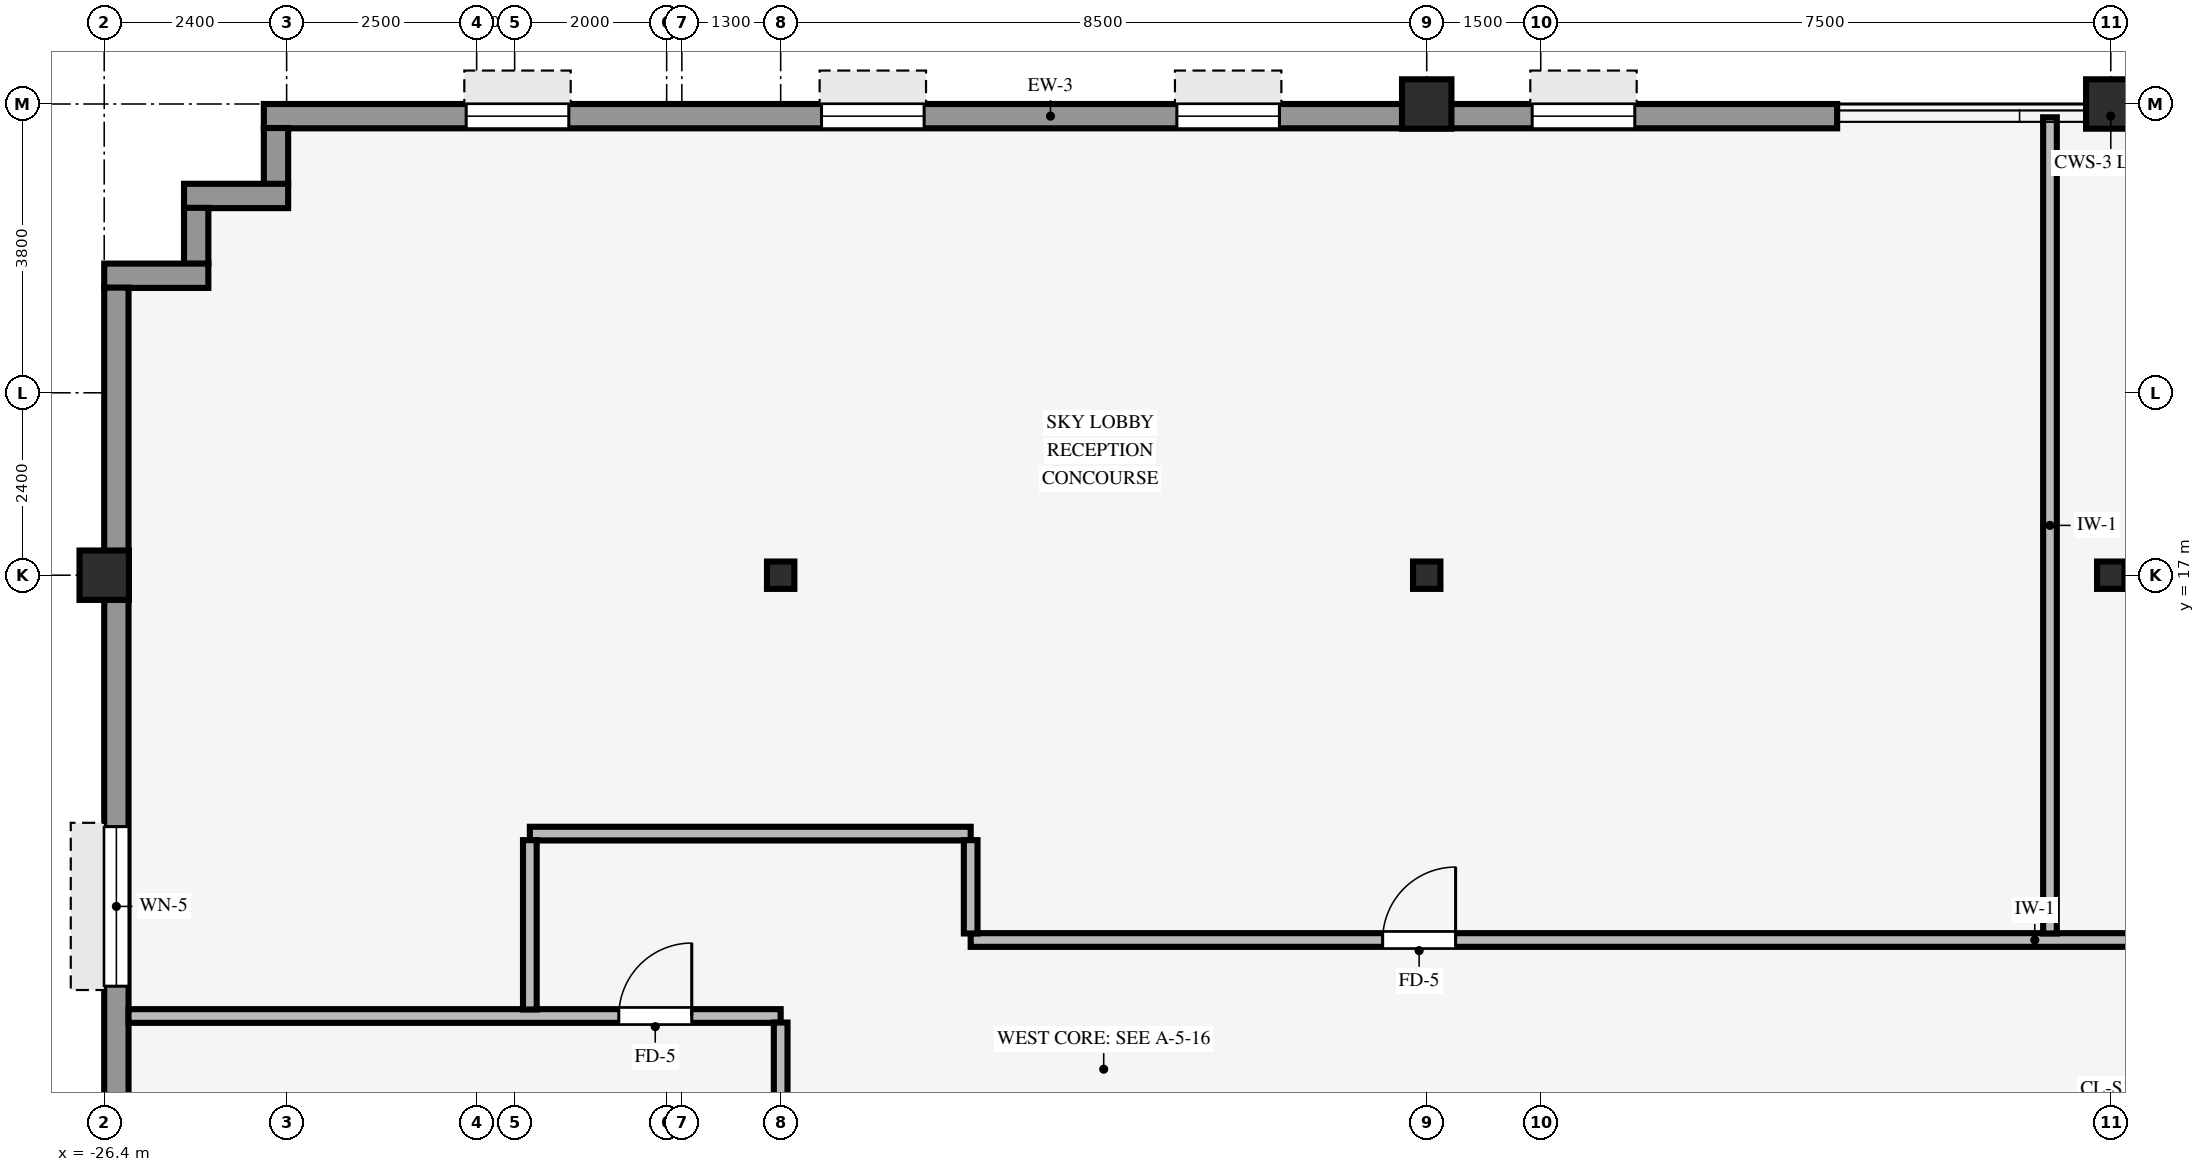
"""IFC4 building model, lengths in metres.
Left out: names, types, materials, properties, quantities, classifications, styles, units other than length and angle.
Written with IfcOpenShell. Run it as: python <this file> out.ifc"""

import sys

from ifc_helpers import new_model, si_unit, direction, frame, frame_2d, origin, origin_2d, place, context, subcontext, project, spatial, rectangle, hollow_rectangle, i_section, extrude, source, transform, mapped, element, fill, save


model = new_model("IFC4")
c1 = context("Model", 3, precision=1e-05, world=origin(), true_north=direction((0.0, 1.0)))
c2 = subcontext(c1, "Body", "Model", "MODEL_VIEW")
j1 = project(units=[si_unit("LENGTHUNIT", "METRE"), si_unit("PLANEANGLEUNIT", "RADIAN")], contexts=[c1])
p1 = place(None, origin())
s1 = spatial("IfcSite", under=j1, at=p1, CompositionType="ELEMENT")
p2 = place(p1, origin())
s2 = spatial("IfcBuilding", under=s1, at=p2, CompositionType="ELEMENT")
p3 = place(p2, frame((0.0, 0.0, 120.2)))
s3 = spatial("IfcBuildingStorey", under=s2, at=p3, CompositionType="ELEMENT", Elevation=120.2)
for number, where, z_axis, x_axis in (
    (1, (-26.4, 17.0, 0.0), (0.0, 0.0, 1.0), (1.0, 0.0, 0.0)),
    (2, (-9.0, 23.2, 0.0), (0.0, 0.0, 1.0), (1.0, 0.0, 0.0)),
    (3, (0.0, 23.2, 0.0), (0.0, 0.0, 1.0), (1.0, 0.0, 0.0)),
):
    element("IfcColumn", number, at=place(p3, frame(where, z_axis=z_axis, x_axis=x_axis)), inside=s3, PredefinedType="COLUMN", context=c2, shape_type="SweptSolid", body=[
        extrude(hollow_rectangle(XDim=0.65, YDim=0.65, WallThickness=0.04, InnerFilletRadius=0.04, OuterFilletRadius=0.08, at=origin_2d()), origin(), (0.0, 0.0, 1.0), 3.37),
    ])
for number, where, z_axis, x_axis in (
    (4, (0.0, 17.0, 0.0), (0.0, 0.0, 1.0), (1.0, 0.0, 0.0)),
    (5, (-17.5, 17.0, 0.0), (0.0, 0.0, 1.0), (1.0, 0.0, 0.0)),
    (6, (-9.0, 17.0, 0.0), (0.0, 0.0, 1.0), (1.0, 0.0, 0.0)),
):
    element("IfcColumn", number, at=place(p3, frame(where, z_axis=z_axis, x_axis=x_axis)), inside=s3, PredefinedType="COLUMN", context=c2, shape_type="SweptSolid", body=[
        extrude(i_section(OverallWidth=0.36, OverallDepth=0.36, WebThickness=0.021, FlangeThickness=0.021, FilletRadius=0.018, at=origin_2d()), origin(), (0.0, 0.0, 1.0), 3.37),
    ])
p4 = place(p3, frame((-24.3, 23.04, 0.0), z_axis=(0.0, 0.0, 1.0), x_axis=(1.0, 0.0, 0.0)))
e7 = element("IfcWall", 7, at=p4, inside=s3, PredefinedType="STANDARD", context=c2, shape_type="SweptSolid", body=[
    extrude(rectangle(XDim=20.7, YDim=0.32, at=frame_2d((10.35, 0.0))), origin(), (0.0, 0.0, 1.0), 2.705),
])
p5 = place(p4, frame((2.663, 0.0, 0.8)))
e8 = element("IfcOpeningElement", 8, at=p5, cuts=e7, PredefinedType="OPENING", context=c2, shape_type="SweptSolid", body=[
    extrude(rectangle(XDim=1.35, YDim=1.56, at=frame_2d((0.675, 0.78))), frame((0.0, 0.17, 0.0), z_axis=(0.0, -1.0, 0.0), x_axis=(1.0, 0.0, 0.0)), (0.0, 0.0, 1.0), 0.34),
])
p6 = place(p4, frame((7.337, 0.0, 0.8)))
e9 = element("IfcOpeningElement", 9, at=p6, cuts=e7, PredefinedType="OPENING", context=c2, shape_type="SweptSolid", body=[
    extrude(rectangle(XDim=1.35, YDim=1.56, at=frame_2d((0.675, 0.78))), frame((0.0, 0.17, 0.0), z_axis=(0.0, -1.0, 0.0), x_axis=(1.0, 0.0, 0.0)), (0.0, 0.0, 1.0), 0.34),
])
p7 = place(p4, frame((12.012, 0.0, 0.8)))
e10 = element("IfcOpeningElement", 10, at=p7, cuts=e7, PredefinedType="OPENING", context=c2, shape_type="SweptSolid", body=[
    extrude(rectangle(XDim=1.35, YDim=1.56, at=frame_2d((0.675, 0.78))), frame((0.0, 0.17, 0.0), z_axis=(0.0, -1.0, 0.0), x_axis=(1.0, 0.0, 0.0)), (0.0, 0.0, 1.0), 0.34),
])
p8 = place(p4, frame((16.688, 0.0, 0.8)))
e11 = element("IfcOpeningElement", 11, at=p8, cuts=e7, PredefinedType="OPENING", context=c2, shape_type="SweptSolid", body=[
    extrude(rectangle(XDim=1.35, YDim=1.56, at=frame_2d((0.675, 0.78))), frame((0.0, 0.17, 0.0), z_axis=(0.0, -1.0, 0.0), x_axis=(1.0, 0.0, 0.0)), (0.0, 0.0, 1.0), 0.34),
])
p9 = place(p3, frame((-24.14, 22.146, 0.0), z_axis=(0.0, 0.0, 1.0), x_axis=(0.0, 1.0, 0.0)))
e12 = element("IfcWall", 12, at=p9, inside=s3, PredefinedType="STANDARD", context=c2, shape_type="SweptSolid", body=[
    extrude(rectangle(XDim=0.738, YDim=0.32, at=frame_2d((0.369, 0.0))), origin(), (0.0, 0.0, 1.0), 3.36),
])
p10 = place(p3, frame((-25.35, 21.99, 0.0), z_axis=(0.0, 0.0, 1.0), x_axis=(1.0, 0.0, 0.0)))
e13 = element("IfcWall", 13, at=p10, inside=s3, PredefinedType="STANDARD", context=c2, shape_type="SweptSolid", body=[
    extrude(rectangle(XDim=1.37, YDim=0.32, at=frame_2d((0.685, 0.0))), origin(), (0.0, 0.0, 1.0), 3.36),
])
p11 = place(p3, frame((-25.19, 21.096, 0.0), z_axis=(0.0, 0.0, 1.0), x_axis=(0.0, 1.0, 0.0)))
e14 = element("IfcWall", 14, at=p11, inside=s3, PredefinedType="STANDARD", context=c2, shape_type="SweptSolid", body=[
    extrude(rectangle(XDim=0.738, YDim=0.32, at=frame_2d((0.369, 0.0))), origin(), (0.0, 0.0, 1.0), 3.36),
])
p12 = place(p3, frame((-26.4, 20.94, 0.0), z_axis=(0.0, 0.0, 1.0), x_axis=(1.0, 0.0, 0.0)))
e15 = element("IfcWall", 15, at=p12, inside=s3, PredefinedType="STANDARD", context=c2, shape_type="SweptSolid", body=[
    extrude(rectangle(XDim=1.37, YDim=0.32, at=frame_2d((0.685, 0.0))), origin(), (0.0, 0.0, 1.0), 3.36),
])
p13 = place(p3, frame((-26.24, 3.6, 0.0), z_axis=(0.0, 0.0, 1.0), x_axis=(0.0, 1.0, 0.0)))
e16 = element("IfcWall", 16, at=p13, inside=s3, PredefinedType="STANDARD", context=c2, shape_type="SweptSolid", body=[
    extrude(rectangle(XDim=17.184, YDim=0.32, at=frame_2d((8.592, 0.0))), origin(), (0.0, 0.0, 1.0), 2.705),
])
p14 = place(p13, frame((2.481, 0.0, 0.8)))
e17 = element("IfcOpeningElement", 17, at=p14, cuts=e16, PredefinedType="OPENING", context=c2, shape_type="SweptSolid", body=[
    extrude(rectangle(XDim=2.1, YDim=1.56, at=frame_2d((1.05, 0.78))), frame((0.0, 0.17, 0.0), z_axis=(0.0, -1.0, 0.0), x_axis=(1.0, 0.0, 0.0)), (0.0, 0.0, 1.0), 0.34),
])
p15 = place(p13, frame((7.992, 0.0, 0.8)))
e18 = element("IfcOpeningElement", 18, at=p15, cuts=e16, PredefinedType="OPENING", context=c2, shape_type="SweptSolid", body=[
    extrude(rectangle(XDim=2.1, YDim=1.56, at=frame_2d((1.05, 0.78))), frame((0.0, 0.17, 0.0), z_axis=(0.0, -1.0, 0.0), x_axis=(1.0, 0.0, 0.0)), (0.0, 0.0, 1.0), 0.34),
])
p16 = place(p3, frame((-26.08, 11.2, 0.0), z_axis=(0.0, 0.0, 1.0), x_axis=(1.0, 0.0, 0.0)))
e19 = element("IfcWall", 19, at=p16, inside=s3, PredefinedType="PARTITIONING", context=c2, shape_type="SweptSolid", body=[
    extrude(rectangle(XDim=8.58, YDim=0.18, at=frame_2d((4.29, 0.0))), origin(), (0.0, 0.0, 1.0), 3.36),
])
p17 = place(p16, frame((6.45, 0.0, 0.0)))
e20 = element("IfcOpeningElement", 20, at=p17, cuts=e19, PredefinedType="OPENING", context=c2, shape_type="SweptSolid", body=[
    extrude(rectangle(XDim=0.96, YDim=2.1, at=frame_2d((0.48, 1.05))), frame((0.0, 0.1, 0.0), z_axis=(0.0, -1.0, 0.0), x_axis=(1.0, 0.0, 0.0)), (0.0, 0.0, 1.0), 0.2),
])
p18 = place(p3, frame((-15.0, 12.2, 0.0), z_axis=(0.0, 0.0, 1.0), x_axis=(1.0, 0.0, 0.0)))
e21 = element("IfcWall", 21, at=p18, inside=s3, PredefinedType="PARTITIONING", context=c2, shape_type="SweptSolid", body=[
    extrude(rectangle(XDim=30.0, YDim=0.18, at=frame_2d((15.0, 0.0))), origin(), (0.0, 0.0, 1.0), 3.36),
])
p19 = place(p18, frame((21.62, 0.0, 0.0)))
e22 = element("IfcOpeningElement", 22, at=p19, cuts=e21, PredefinedType="OPENING", context=c2, shape_type="SweptSolid", body=[
    extrude(rectangle(XDim=0.96, YDim=2.1, at=frame_2d((0.48, 1.05))), frame((0.0, 0.1, 0.0), z_axis=(0.0, -1.0, 0.0), x_axis=(1.0, 0.0, 0.0)), (0.0, 0.0, 1.0), 0.2),
])
p20 = place(p18, frame((5.42, 0.0, 0.0)))
e23 = element("IfcOpeningElement", 23, at=p20, cuts=e21, PredefinedType="OPENING", context=c2, shape_type="SweptSolid", body=[
    extrude(rectangle(XDim=0.96, YDim=2.1, at=frame_2d((0.48, 1.05))), frame((0.0, 0.1, 0.0), z_axis=(0.0, -1.0, 0.0), x_axis=(1.0, 0.0, 0.0)), (0.0, 0.0, 1.0), 0.2),
])
p21 = place(p3, frame((-20.8, 13.6, 0.0), z_axis=(0.0, 0.0, 1.0), x_axis=(1.0, 0.0, 0.0)))
e24 = element("IfcWall", 24, at=p21, inside=s3, PredefinedType="PARTITIONING", context=c2, shape_type="SweptSolid", body=[
    extrude(rectangle(XDim=5.8, YDim=0.18, at=frame_2d((2.9, 0.0))), origin(), (0.0, 0.0, 1.0), 2.998),
])
p22 = place(p3, frame((-20.8, 11.286, 0.0), z_axis=(0.0, 0.0, 1.0), x_axis=(0.0, 1.0, 0.0)))
e25 = element("IfcWall", 25, at=p22, inside=s3, PredefinedType="PARTITIONING", context=c2, shape_type="SweptSolid", body=[
    extrude(rectangle(XDim=2.228, YDim=0.18, at=frame_2d((1.114, 0.0))), origin(), (0.0, 0.0, 1.0), 3.36),
])
p23 = place(p3, frame((-17.5, 10.146, 0.0), z_axis=(0.0, 0.0, 1.0), x_axis=(0.0, 1.0, 0.0)))
e26 = element("IfcWall", 26, at=p23, inside=s3, PredefinedType="PARTITIONING", context=c2, shape_type="SweptSolid", body=[
    extrude(rectangle(XDim=0.968, YDim=0.18, at=frame_2d((0.484, 0.0))), origin(), (0.0, 0.0, 1.0), 2.816),
])
p24 = place(p3, frame((-15.0, 12.286, 0.0), z_axis=(0.0, 0.0, 1.0), x_axis=(0.0, 1.0, 0.0)))
e27 = element("IfcWall", 27, at=p24, inside=s3, PredefinedType="PARTITIONING", context=c2, shape_type="SweptSolid", body=[
    extrude(rectangle(XDim=1.228, YDim=0.18, at=frame_2d((0.614, 0.0))), origin(), (0.0, 0.0, 1.0), 3.36),
])
p25 = place(p3, frame((-0.8, 12.286, 0.0), z_axis=(0.0, 0.0, 1.0), x_axis=(0.0, 1.0, 0.0)))
e28 = element("IfcWall", 28, at=p25, inside=s3, PredefinedType="PARTITIONING", context=c2, shape_type="SweptSolid", body=[
    extrude(rectangle(XDim=10.739, YDim=0.18, at=frame_2d((5.37, 0.0))), origin(), (0.0, 0.0, 1.0), 3.36),
])
m1 = source(origin(), c2, "Body", "SweptSolid", [
    extrude(rectangle(XDim=1.35, YDim=1.56, at=frame_2d((0.675, 0.78))), frame((0.0, 0.03, 0.0), z_axis=(0.0, -1.0, 0.0), x_axis=(1.0, 0.0, 0.0)), (0.0, 0.0, 1.0), 0.06),
])
p26 = place(p5, origin())
e29 = element("IfcWindow", 29, at=p26, inside=s3, PartitioningType="SINGLE_PANEL", PredefinedType="WINDOW", context=c2, shape_type="MappedRepresentation", body=[
    mapped(m1, transform((0.0, 0.0, 0.0), scale=1.0)),
])
fill(e8, e29)
p27 = place(p6, origin())
e30 = element("IfcWindow", 30, at=p27, inside=s3, PartitioningType="SINGLE_PANEL", PredefinedType="WINDOW", context=c2, shape_type="MappedRepresentation", body=[
    mapped(m1, transform((0.0, 0.0, 0.0), scale=1.0)),
])
fill(e9, e30)
p28 = place(p7, origin())
e31 = element("IfcWindow", 31, at=p28, inside=s3, PartitioningType="SINGLE_PANEL", PredefinedType="WINDOW", context=c2, shape_type="MappedRepresentation", body=[
    mapped(m1, transform((0.0, 0.0, 0.0), scale=1.0)),
])
fill(e10, e31)
p29 = place(p8, origin())
e32 = element("IfcWindow", 32, at=p29, inside=s3, PartitioningType="SINGLE_PANEL", PredefinedType="WINDOW", context=c2, shape_type="MappedRepresentation", body=[
    mapped(m1, transform((0.0, 0.0, 0.0), scale=1.0)),
])
fill(e11, e32)
m2 = source(origin(), c2, "Body", "SweptSolid", [
    extrude(rectangle(XDim=2.1, YDim=1.56, at=frame_2d((1.05, 0.78))), frame((0.0, 0.03, 0.0), z_axis=(0.0, -1.0, 0.0), x_axis=(1.0, 0.0, 0.0)), (0.0, 0.0, 1.0), 0.06),
])
p30 = place(p15, origin())
e33 = element("IfcWindow", 33, at=p30, inside=s3, PartitioningType="SINGLE_PANEL", PredefinedType="WINDOW", context=c2, shape_type="MappedRepresentation", body=[
    mapped(m2, transform((0.0, 0.0, 0.0), scale=1.0)),
])
fill(e18, e33)
m3 = source(origin(), c2, "Body", "SweptSolid", [
    extrude(rectangle(XDim=0.96, YDim=2.1, at=frame_2d((0.48, 1.05))), frame((0.0, 0.025, 0.0), z_axis=(0.0, -1.0, 0.0), x_axis=(1.0, 0.0, 0.0)), (0.0, 0.0, 1.0), 0.05),
])
p31 = place(p20, origin())
e34 = element("IfcDoor", 34, at=p31, inside=s3, OperationType="SINGLE_SWING_RIGHT", PredefinedType="DOOR", context=c2, shape_type="MappedRepresentation", body=[
    mapped(m3, transform((0.0, 0.0, 0.0), scale=1.0)),
])
fill(e23, e34)
p32 = place(p17, origin())
e35 = element("IfcDoor", 35, at=p32, inside=s3, OperationType="SINGLE_SWING_RIGHT", PredefinedType="DOOR", context=c2, shape_type="MappedRepresentation", body=[
    mapped(m3, transform((0.0, 0.0, 0.0), scale=1.0)),
])
fill(e20, e35)
save(model, sys.argv[1])
